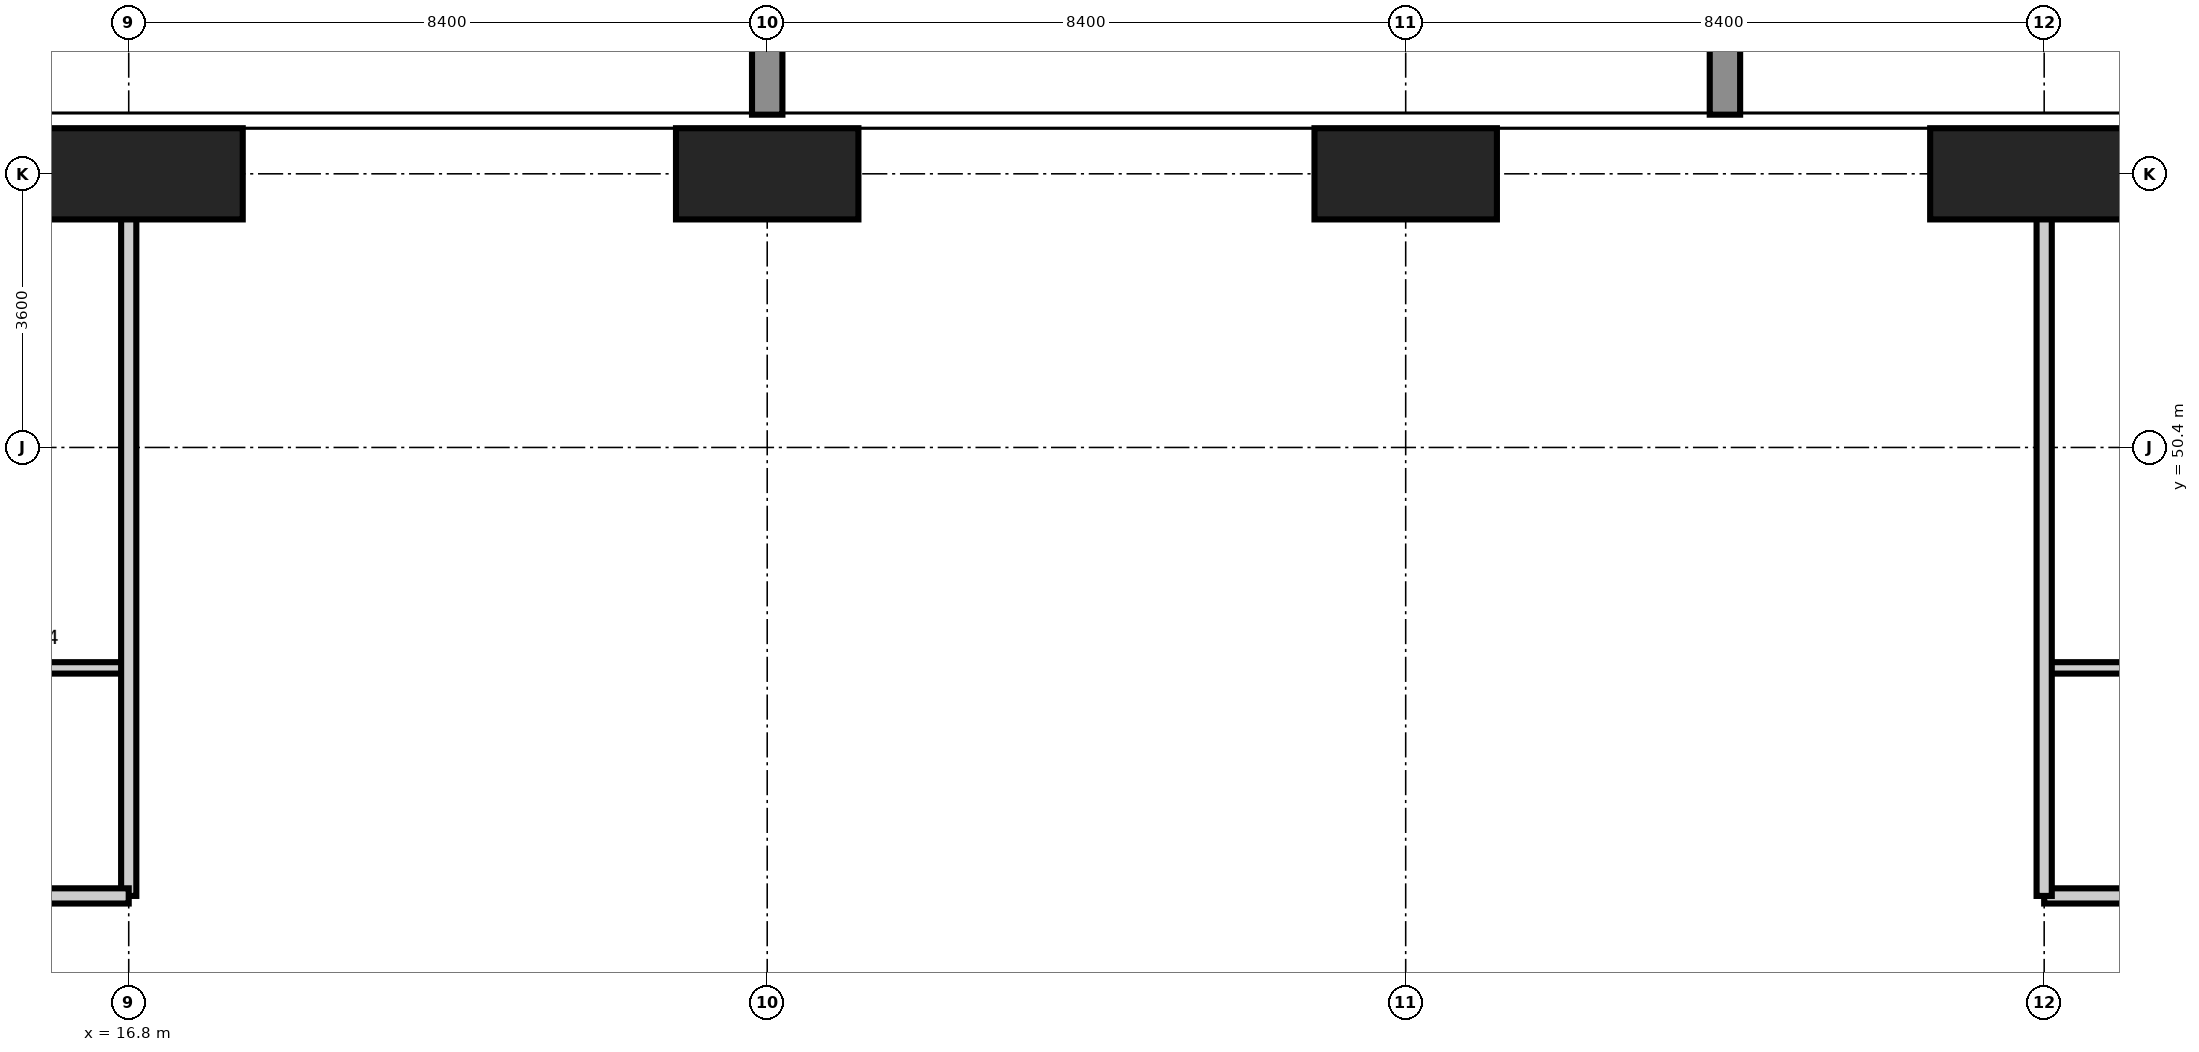
"""IFC4 building model, lengths in metres.
Left out: names, types, materials, properties, quantities, classifications, styles, units other than length and angle.
Written with IfcOpenShell. Run it as: python <this file> out.ifc"""

import sys

from ifc_helpers import new_model, si_unit, direction, frame, frame_2d, origin, origin_2d, place, context, subcontext, project, spatial, rectangle, extrude, element, save


model = new_model("IFC4")
c1 = context("Model", 3, precision=1e-05, world=origin(), true_north=direction((0.0, 1.0)))
c2 = subcontext(c1, "Body", "Model", "MODEL_VIEW")
j1 = project(units=[si_unit("LENGTHUNIT", "METRE"), si_unit("PLANEANGLEUNIT", "RADIAN")], contexts=[c1])
p1 = place(None, origin())
s1 = spatial("IfcSite", under=j1, at=p1, CompositionType="ELEMENT")
p2 = place(p1, origin())
s2 = spatial("IfcBuilding", under=s1, at=p2, CompositionType="ELEMENT")
p3 = place(p2, frame((0.0, 0.0, 213.0)))
s3 = spatial("IfcBuildingStorey", under=s2, at=p3, CompositionType="ELEMENT", Elevation=213.0)
p4 = place(p3, frame((16.8, 54.0, -0.35), z_axis=(0.0, 0.0, 1.0), x_axis=(1.0, 0.0, 0.0)))
e1 = element("IfcColumn", 1, at=p4, inside=s3, PredefinedType="COLUMN", context=c2, shape_type="SweptSolid", body=[
    extrude(rectangle(XDim=3.0, YDim=1.2, at=origin_2d()), origin(), (0.0, 0.0, 1.0), 3.6),
])
for number, where, z_axis, x_axis in (
    (2, (25.2, 54.0, -0.35), (0.0, 0.0, 1.0), (1.0, 0.0, 0.0)),
    (3, (33.6, 54.0, -0.35), (0.0, 0.0, 1.0), (1.0, 0.0, 0.0)),
):
    element("IfcColumn", number, at=place(p3, frame(where, z_axis=z_axis, x_axis=x_axis)), inside=s3, PredefinedType="COLUMN", context=c2, shape_type="SweptSolid", body=[
        extrude(rectangle(XDim=2.4, YDim=1.2, at=origin_2d()), origin(), (0.0, 0.0, 1.0), 3.6),
    ])
p5 = place(p3, frame((42.0, 54.0, -0.35), z_axis=(0.0, 0.0, 1.0), x_axis=(1.0, 0.0, 0.0)))
e4 = element("IfcColumn", 4, at=p5, inside=s3, PredefinedType="COLUMN", context=c2, shape_type="SweptSolid", body=[
    extrude(rectangle(XDim=3.0, YDim=1.2, at=origin_2d()), origin(), (0.0, 0.0, 1.0), 3.6),
])
p6 = place(p3, frame((13.7, 47.5, 0.0), z_axis=(0.0, 0.0, 1.0), x_axis=(1.0, 0.0, 0.0)))
e5 = element("IfcWall", 5, at=p6, inside=s3, PredefinedType="PARTITIONING", context=c2, shape_type="SweptSolid", body=[
    extrude(rectangle(XDim=3.1, YDim=0.15, at=frame_2d((1.55, 0.0))), origin(), (0.0, 0.0, 1.0), 3.25),
])
p7 = place(p6, frame((1.125, 0.0, 0.0)))
e6 = element("IfcOpeningElement", 6, at=p7, cuts=e5, PredefinedType="OPENING", context=c2, shape_type="SweptSolid", body=[
    extrude(rectangle(XDim=0.85, YDim=2.1, at=frame_2d((0.425, 1.05))), frame((0.0, 0.085, 0.0), z_axis=(0.0, -1.0, 0.0), x_axis=(1.0, 0.0, 0.0)), (0.0, 0.0, 1.0), 0.17),
])
p8 = place(p3, frame((42.0, 47.5, 0.0), z_axis=(0.0, 0.0, 1.0), x_axis=(1.0, 0.0, 0.0)))
e7 = element("IfcWall", 7, at=p8, inside=s3, PredefinedType="PARTITIONING", context=c2, shape_type="SweptSolid", body=[
    extrude(rectangle(XDim=3.7, YDim=0.15, at=frame_2d((1.85, 0.0))), origin(), (0.0, 0.0, 1.0), 3.25),
])
p9 = place(p8, frame((1.425, 0.0, 0.0)))
e8 = element("IfcOpeningElement", 8, at=p9, cuts=e7, PredefinedType="OPENING", context=c2, shape_type="SweptSolid", body=[
    extrude(rectangle(XDim=0.85, YDim=2.1, at=frame_2d((0.425, 1.05))), frame((0.0, 0.085, 0.0), z_axis=(0.0, -1.0, 0.0), x_axis=(1.0, 0.0, 0.0)), (0.0, 0.0, 1.0), 0.17),
])
p10 = place(p3, frame((16.8, 44.5, 0.0), z_axis=(0.0, 0.0, 1.0), x_axis=(0.0, 1.0, 0.0)))
e9 = element("IfcWall", 9, at=p10, inside=s3, PredefinedType="PARTITIONING", context=c2, shape_type="SweptSolid", body=[
    extrude(rectangle(XDim=10.118, YDim=0.2, at=frame_2d((5.059, 0.0))), origin(), (0.0, 0.0, 1.0), 3.25),
])
p11 = place(p3, frame((13.7, 44.5, 0.0), z_axis=(0.0, 0.0, 1.0), x_axis=(1.0, 0.0, 0.0)))
e10 = element("IfcWall", 10, at=p11, inside=s3, PredefinedType="PARTITIONING", context=c2, shape_type="SweptSolid", body=[
    extrude(rectangle(XDim=3.1, YDim=0.2, at=frame_2d((1.55, 0.0))), origin(), (0.0, 0.0, 1.0), 3.25),
])
p12 = place(p3, frame((42.0, 44.5, 0.0), z_axis=(0.0, 0.0, 1.0), x_axis=(1.0, 0.0, 0.0)))
e11 = element("IfcWall", 11, at=p12, inside=s3, PredefinedType="PARTITIONING", context=c2, shape_type="SweptSolid", body=[
    extrude(rectangle(XDim=3.7, YDim=0.2, at=frame_2d((1.85, 0.0))), origin(), (0.0, 0.0, 1.0), 3.25),
])
p13 = place(p3, frame((42.0, 54.618, 0.0), z_axis=(0.0, 0.0, 1.0), x_axis=(0.0, -1.0, 0.0)))
e12 = element("IfcWall", 12, at=p13, inside=s3, PredefinedType="PARTITIONING", context=c2, shape_type="SweptSolid", body=[
    extrude(rectangle(XDim=10.118, YDim=0.2, at=frame_2d((5.059, 0.0))), origin(), (0.0, 0.0, 1.0), 3.25),
])
save(model, sys.argv[1])
